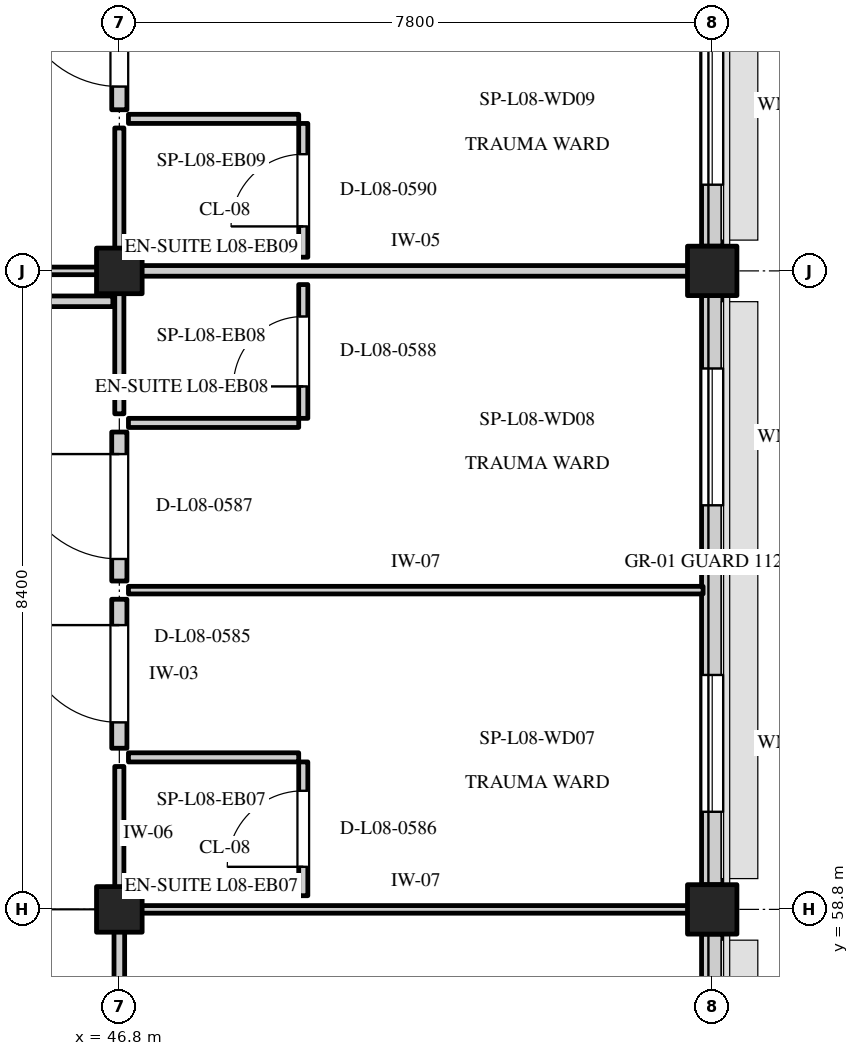
"""IFC4 building model, lengths in metres.
Left out: names, types, materials, properties, quantities, classifications, styles, units other than length and angle.
Written with IfcOpenShell. Run it as: python <this file> out.ifc"""

import sys

from ifc_helpers import new_model, si_unit, direction, frame, frame_2d, origin, origin_2d, place, context, subcontext, project, spatial, rectangle, extrude, element, fill, save


model = new_model("IFC4")
c1 = context("Model", 3, precision=1e-05, world=origin(), true_north=direction((0.0, 1.0)))
c2 = subcontext(c1, "Body", "Model", "MODEL_VIEW")
j1 = project(units=[si_unit("LENGTHUNIT", "METRE"), si_unit("PLANEANGLEUNIT", "RADIAN")], contexts=[c1])
p1 = place(None, origin())
s1 = spatial("IfcSite", under=j1, at=p1, CompositionType="ELEMENT")
p2 = place(p1, origin())
s2 = spatial("IfcBuilding", under=s1, at=p2, CompositionType="ELEMENT")
p3 = place(p2, frame((0.0, 0.0, 33.9)))
s3 = spatial("IfcBuildingStorey", under=s2, at=p3, CompositionType="ELEMENT", Elevation=33.9)
for number, where, z_axis, x_axis in (
    (1, (46.8, 58.8, 0.0), (0.0, 0.0, 1.0), (1.0, 0.0, 0.0)),
    (2, (46.8, 67.2, 0.0), (0.0, 0.0, 1.0), (1.0, 0.0, 0.0)),
):
    element("IfcColumn", number, at=place(p3, frame(where, z_axis=z_axis, x_axis=x_axis)), inside=s3, PredefinedType="COLUMN", context=c2, shape_type="SweptSolid", body=[
        extrude(rectangle(XDim=0.6, YDim=0.6, at=origin_2d()), origin(), (0.0, 0.0, 1.0), 3.9),
    ])
for number, where, z_axis, x_axis in (
    (3, (54.6, 58.8, 0.0), (0.0, 0.0, 1.0), (1.0, 0.0, 0.0)),
    (4, (54.6, 67.2, 0.0), (0.0, 0.0, 1.0), (1.0, 0.0, 0.0)),
):
    element("IfcColumn", number, at=place(p3, frame(where, z_axis=z_axis, x_axis=x_axis)), inside=s3, PredefinedType="COLUMN", context=c2, shape_type="SweptSolid", body=[
        extrude(rectangle(XDim=0.65, YDim=0.65, at=origin_2d()), origin(), (0.0, 0.0, 1.0), 3.9),
    ])
p4 = place(p3, frame((54.6, 50.725, 0.0), z_axis=(0.0, 0.0, 1.0), x_axis=(0.0, 1.0, 0.0)))
e5 = element("IfcWall", 5, at=p4, inside=s3, PredefinedType="STANDARD", context=c2, shape_type="SweptSolid", body=[
    extrude(rectangle(XDim=7.75, YDim=0.28, at=frame_2d((3.875, 0.0))), origin(), (0.0, 0.0, 1.0), 2.95),
])
p5 = place(p4, frame((0.959, 0.0, 0.8)))
e6 = element("IfcOpeningElement", 6, at=p5, cuts=e5, PredefinedType="OPENING", context=c2, shape_type="SweptSolid", body=[
    extrude(rectangle(XDim=1.8, YDim=1.55, at=frame_2d((0.9, 0.775))), frame((0.0, 0.152, 0.0), z_axis=(0.0, -1.0, 0.0), x_axis=(1.0, 0.0, 0.0)), (0.0, 0.0, 1.0), 0.304),
])
p6 = place(p4, frame((4.991, 0.0, 0.8)))
e7 = element("IfcOpeningElement", 7, at=p6, cuts=e5, PredefinedType="OPENING", context=c2, shape_type="SweptSolid", body=[
    extrude(rectangle(XDim=1.8, YDim=1.55, at=frame_2d((0.9, 0.775))), frame((0.0, 0.152, 0.0), z_axis=(0.0, -1.0, 0.0), x_axis=(1.0, 0.0, 0.0)), (0.0, 0.0, 1.0), 0.304),
])
p7 = place(p3, frame((54.6, 59.125, 0.0), z_axis=(0.0, 0.0, 1.0), x_axis=(0.0, 1.0, 0.0)))
e8 = element("IfcWall", 8, at=p7, inside=s3, PredefinedType="STANDARD", context=c2, shape_type="SweptSolid", body=[
    extrude(rectangle(XDim=7.75, YDim=0.28, at=frame_2d((3.875, 0.0))), origin(), (0.0, 0.0, 1.0), 2.95),
])
p8 = place(p7, frame((0.959, 0.0, 0.8)))
e9 = element("IfcOpeningElement", 9, at=p8, cuts=e8, PredefinedType="OPENING", context=c2, shape_type="SweptSolid", body=[
    extrude(rectangle(XDim=1.8, YDim=1.45, at=frame_2d((0.9, 0.725))), frame((0.0, 0.152, 0.0), z_axis=(0.0, -1.0, 0.0), x_axis=(1.0, 0.0, 0.0)), (0.0, 0.0, 1.0), 0.304),
])
p9 = place(p7, frame((4.991, 0.0, 0.8)))
e10 = element("IfcOpeningElement", 10, at=p9, cuts=e8, PredefinedType="OPENING", context=c2, shape_type="SweptSolid", body=[
    extrude(rectangle(XDim=1.8, YDim=1.45, at=frame_2d((0.9, 0.725))), frame((0.0, 0.152, 0.0), z_axis=(0.0, -1.0, 0.0), x_axis=(1.0, 0.0, 0.0)), (0.0, 0.0, 1.0), 0.304),
])
p10 = place(p3, frame((54.6, 67.525, 0.0), z_axis=(0.0, 0.0, 1.0), x_axis=(0.0, 1.0, 0.0)))
e11 = element("IfcWall", 11, at=p10, inside=s3, PredefinedType="STANDARD", context=c2, shape_type="SweptSolid", body=[
    extrude(rectangle(XDim=7.75, YDim=0.28, at=frame_2d((3.875, 0.0))), origin(), (0.0, 0.0, 1.0), 2.95),
])
p11 = place(p10, frame((0.809, 0.0, 0.8)))
e12 = element("IfcOpeningElement", 12, at=p11, cuts=e11, PredefinedType="OPENING", context=c2, shape_type="SweptSolid", body=[
    extrude(rectangle(XDim=2.1, YDim=1.75, at=frame_2d((1.05, 0.875))), frame((0.0, 0.152, 0.0), z_axis=(0.0, -1.0, 0.0), x_axis=(1.0, 0.0, 0.0)), (0.0, 0.0, 1.0), 0.304),
])
p12 = place(p10, frame((4.841, 0.0, 0.8)))
e13 = element("IfcOpeningElement", 13, at=p12, cuts=e11, PredefinedType="OPENING", context=c2, shape_type="SweptSolid", body=[
    extrude(rectangle(XDim=2.1, YDim=1.75, at=frame_2d((1.05, 0.875))), frame((0.0, 0.152, 0.0), z_axis=(0.0, -1.0, 0.0), x_axis=(1.0, 0.0, 0.0)), (0.0, 0.0, 1.0), 0.304),
])
p13 = place(p3, frame((46.92, 58.8, 0.0), z_axis=(0.0, 0.0, 1.0), x_axis=(1.0, 0.0, 0.0)))
e14 = element("IfcWall", 14, at=p13, inside=s3, PredefinedType="PARTITIONING", context=c2, shape_type="SweptSolid", body=[
    extrude(rectangle(XDim=7.56, YDim=0.1, at=frame_2d((3.78, 0.0))), origin(), (0.0, 0.0, 1.0), 2.95),
])
p14 = place(p3, frame((46.92, 63.0, 0.0), z_axis=(0.0, 0.0, 1.0), x_axis=(1.0, 0.0, 0.0)))
e15 = element("IfcWall", 15, at=p14, inside=s3, PredefinedType="PARTITIONING", context=c2, shape_type="SweptSolid", body=[
    extrude(rectangle(XDim=7.56, YDim=0.1, at=frame_2d((3.78, 0.0))), origin(), (0.0, 0.0, 1.0), 3.58),
])
p15 = place(p3, frame((46.8, 60.92, 0.0), z_axis=(0.0, 0.0, 1.0), x_axis=(0.0, 1.0, 0.0)))
e16 = element("IfcWall", 16, at=p15, inside=s3, PredefinedType="STANDARD", context=c2, shape_type="SweptSolid", body=[
    extrude(rectangle(XDim=1.96, YDim=0.2, at=frame_2d((0.98, 0.0))), origin(), (0.0, 0.0, 1.0), 3.58),
])
p16 = place(p15, frame((0.34, 0.0, 0.0)))
e17 = element("IfcOpeningElement", 17, at=p16, cuts=e16, PredefinedType="OPENING", context=c2, shape_type="SweptSolid", body=[
    extrude(rectangle(XDim=1.28, YDim=2.15, at=frame_2d((0.64, 1.075))), frame((0.0, 0.112, 0.0), z_axis=(0.0, -1.0, 0.0), x_axis=(1.0, 0.0, 0.0)), (0.0, 0.0, 1.0), 0.224),
])
p17 = place(p3, frame((46.8, 58.92, 0.0), z_axis=(0.0, 0.0, 1.0), x_axis=(0.0, 1.0, 0.0)))
e18 = element("IfcWall", 18, at=p17, inside=s3, PredefinedType="PARTITIONING", context=c2, shape_type="SweptSolid", body=[
    extrude(rectangle(XDim=1.76, YDim=0.12, at=frame_2d((0.88, 0.0))), origin(), (0.0, 0.0, 1.0), 3.58),
])
p18 = place(p3, frame((46.92, 60.8, 0.0), z_axis=(0.0, 0.0, 1.0), x_axis=(1.0, 0.0, 0.0)))
e19 = element("IfcWall", 19, at=p18, inside=s3, PredefinedType="PARTITIONING", context=c2, shape_type="SweptSolid", body=[
    extrude(rectangle(XDim=2.24, YDim=0.12, at=frame_2d((1.12, 0.0))), origin(), (0.0, 0.0, 1.0), 3.58),
])
p19 = place(p3, frame((49.22, 58.98, 0.0), z_axis=(0.0, 0.0, 1.0), x_axis=(0.0, 1.0, 0.0)))
e20 = element("IfcWall", 20, at=p19, inside=s3, PredefinedType="PARTITIONING", context=c2, shape_type="SweptSolid", body=[
    extrude(rectangle(XDim=1.76, YDim=0.12, at=frame_2d((0.88, 0.0))), origin(), (0.0, 0.0, 1.0), 3.58),
])
p20 = place(p19, frame((0.38, 0.0, 0.0)))
e21 = element("IfcOpeningElement", 21, at=p20, cuts=e20, PredefinedType="OPENING", context=c2, shape_type="SweptSolid", body=[
    extrude(rectangle(XDim=1.0, YDim=2.1, at=frame_2d((0.5, 1.05))), frame((0.0, 0.072, 0.0), z_axis=(0.0, -1.0, 0.0), x_axis=(1.0, 0.0, 0.0)), (0.0, 0.0, 1.0), 0.144),
])
p21 = place(p3, frame((46.92, 67.2, 0.0), z_axis=(0.0, 0.0, 1.0), x_axis=(1.0, 0.0, 0.0)))
e22 = element("IfcWall", 22, at=p21, inside=s3, PredefinedType="PARTITIONING", context=c2, shape_type="SweptSolid", body=[
    extrude(rectangle(XDim=7.56, YDim=0.14, at=frame_2d((3.78, 0.0))), origin(), (0.0, 0.0, 1.0), 3.58),
])
p22 = place(p3, frame((46.8, 63.12, 0.0), z_axis=(0.0, 0.0, 1.0), x_axis=(0.0, 1.0, 0.0)))
e23 = element("IfcWall", 23, at=p22, inside=s3, PredefinedType="STANDARD", context=c2, shape_type="SweptSolid", body=[
    extrude(rectangle(XDim=1.96, YDim=0.2, at=frame_2d((0.98, 0.0))), origin(), (0.0, 0.0, 1.0), 3.58),
])
p23 = place(p22, frame((0.29, 0.0, 0.0)))
e24 = element("IfcOpeningElement", 24, at=p23, cuts=e23, PredefinedType="OPENING", context=c2, shape_type="SweptSolid", body=[
    extrude(rectangle(XDim=1.38, YDim=2.2, at=frame_2d((0.69, 1.1))), frame((0.0, 0.112, 0.0), z_axis=(0.0, -1.0, 0.0), x_axis=(1.0, 0.0, 0.0)), (0.0, 0.0, 1.0), 0.224),
])
p24 = place(p3, frame((46.8, 65.32, 0.0), z_axis=(0.0, 0.0, 1.0), x_axis=(0.0, 1.0, 0.0)))
e25 = element("IfcWall", 25, at=p24, inside=s3, PredefinedType="PARTITIONING", context=c2, shape_type="SweptSolid", body=[
    extrude(rectangle(XDim=1.76, YDim=0.12, at=frame_2d((0.88, 0.0))), origin(), (0.0, 0.0, 1.0), 3.58),
])
p25 = place(p3, frame((46.92, 65.2, 0.0), z_axis=(0.0, 0.0, 1.0), x_axis=(1.0, 0.0, 0.0)))
e26 = element("IfcWall", 26, at=p25, inside=s3, PredefinedType="PARTITIONING", context=c2, shape_type="SweptSolid", body=[
    extrude(rectangle(XDim=2.24, YDim=0.12, at=frame_2d((1.12, 0.0))), origin(), (0.0, 0.0, 1.0), 3.58),
])
p26 = place(p3, frame((49.22, 65.26, 0.0), z_axis=(0.0, 0.0, 1.0), x_axis=(0.0, 1.0, 0.0)))
e27 = element("IfcWall", 27, at=p26, inside=s3, PredefinedType="PARTITIONING", context=c2, shape_type="SweptSolid", body=[
    extrude(rectangle(XDim=1.76, YDim=0.12, at=frame_2d((0.88, 0.0))), origin(), (0.0, 0.0, 1.0), 3.58),
])
p27 = place(p26, frame((0.42, 0.0, 0.0)))
e28 = element("IfcOpeningElement", 28, at=p27, cuts=e27, PredefinedType="OPENING", context=c2, shape_type="SweptSolid", body=[
    extrude(rectangle(XDim=0.92, YDim=2.08, at=frame_2d((0.46, 1.04))), frame((0.0, 0.072, 0.0), z_axis=(0.0, -1.0, 0.0), x_axis=(1.0, 0.0, 0.0)), (0.0, 0.0, 1.0), 0.144),
])
p28 = place(p3, frame((46.8, 69.32, 0.0), z_axis=(0.0, 0.0, 1.0), x_axis=(0.0, 1.0, 0.0)))
e29 = element("IfcWall", 29, at=p28, inside=s3, PredefinedType="STANDARD", context=c2, shape_type="SweptSolid", body=[
    extrude(rectangle(XDim=1.96, YDim=0.2, at=frame_2d((0.98, 0.0))), origin(), (0.0, 0.0, 1.0), 3.58),
])
p29 = place(p28, frame((0.305, 0.0, 0.0)))
e30 = element("IfcOpeningElement", 30, at=p29, cuts=e29, PredefinedType="OPENING", context=c2, shape_type="SweptSolid", body=[
    extrude(rectangle(XDim=1.35, YDim=2.15, at=frame_2d((0.675, 1.075))), frame((0.0, 0.112, 0.0), z_axis=(0.0, -1.0, 0.0), x_axis=(1.0, 0.0, 0.0)), (0.0, 0.0, 1.0), 0.224),
])
p30 = place(p3, frame((46.8, 67.32, 0.0), z_axis=(0.0, 0.0, 1.0), x_axis=(0.0, 1.0, 0.0)))
e31 = element("IfcWall", 31, at=p30, inside=s3, PredefinedType="PARTITIONING", context=c2, shape_type="SweptSolid", body=[
    extrude(rectangle(XDim=1.76, YDim=0.12, at=frame_2d((0.88, 0.0))), origin(), (0.0, 0.0, 1.0), 3.58),
])
p31 = place(p3, frame((46.92, 69.2, 0.0), z_axis=(0.0, 0.0, 1.0), x_axis=(1.0, 0.0, 0.0)))
e32 = element("IfcWall", 32, at=p31, inside=s3, PredefinedType="PARTITIONING", context=c2, shape_type="SweptSolid", body=[
    extrude(rectangle(XDim=2.24, YDim=0.12, at=frame_2d((1.12, 0.0))), origin(), (0.0, 0.0, 1.0), 3.58),
])
p32 = place(p3, frame((49.22, 67.38, 0.0), z_axis=(0.0, 0.0, 1.0), x_axis=(0.0, 1.0, 0.0)))
e33 = element("IfcWall", 33, at=p32, inside=s3, PredefinedType="PARTITIONING", context=c2, shape_type="SweptSolid", body=[
    extrude(rectangle(XDim=1.76, YDim=0.12, at=frame_2d((0.88, 0.0))), origin(), (0.0, 0.0, 1.0), 3.58),
])
p33 = place(p32, frame((0.405, 0.0, 0.0)))
e34 = element("IfcOpeningElement", 34, at=p33, cuts=e33, PredefinedType="OPENING", context=c2, shape_type="SweptSolid", body=[
    extrude(rectangle(XDim=0.95, YDim=2.1, at=frame_2d((0.475, 1.05))), frame((0.0, 0.072, 0.0), z_axis=(0.0, -1.0, 0.0), x_axis=(1.0, 0.0, 0.0)), (0.0, 0.0, 1.0), 0.144),
])
p34 = place(p3, frame((31.285, 66.8, 0.0), z_axis=(0.0, 0.0, 1.0), x_axis=(1.0, 0.0, 0.0)))
e35 = element("IfcWall", 35, at=p34, inside=s3, PredefinedType="PARTITIONING", context=c2, shape_type="SweptSolid", body=[
    extrude(rectangle(XDim=15.43, YDim=0.14, at=frame_2d((7.715, 0.0))), origin(), (0.0, 0.0, 1.0), 3.58),
])
p35 = place(p3, frame((46.8, 54.085, 0.0), z_axis=(0.0, 0.0, 1.0), x_axis=(0.0, 1.0, 0.0)))
e36 = element("IfcWall", 36, at=p35, inside=s3, PredefinedType="PARTITIONING", context=c2, shape_type="SweptSolid", body=[
    extrude(rectangle(XDim=4.795, YDim=0.14, at=frame_2d((2.397, 0.0))), origin(), (0.0, 0.0, 1.0), 3.58),
])
p36 = place(p3, frame((31.285, 67.2, 0.0), z_axis=(0.0, 0.0, 1.0), x_axis=(1.0, 0.0, 0.0)))
e37 = element("IfcWall", 37, at=p36, inside=s3, PredefinedType="PARTITIONING", context=c2, shape_type="SweptSolid", body=[
    extrude(rectangle(XDim=15.43, YDim=0.1, at=frame_2d((7.715, 0.0))), origin(), (0.0, 0.0, 1.0), 3.58),
])
p37 = place(p8, origin())
e38 = element("IfcWindow", 38, at=p37, inside=s3, PartitioningType="DOUBLE_PANEL_VERTICAL", PredefinedType="WINDOW", context=c2, shape_type="SweptSolid", body=[
    extrude(rectangle(XDim=1.8, YDim=1.45, at=frame_2d((0.9, 0.725))), frame((0.0, 0.03, 0.0), z_axis=(0.0, -1.0, 0.0), x_axis=(1.0, 0.0, 0.0)), (0.0, 0.0, 1.0), 0.06),
])
fill(e9, e38)
p38 = place(p9, origin())
e39 = element("IfcWindow", 39, at=p38, inside=s3, PartitioningType="DOUBLE_PANEL_VERTICAL", PredefinedType="WINDOW", context=c2, shape_type="SweptSolid", body=[
    extrude(rectangle(XDim=1.8, YDim=1.45, at=frame_2d((0.9, 0.725))), frame((0.0, 0.03, 0.0), z_axis=(0.0, -1.0, 0.0), x_axis=(1.0, 0.0, 0.0)), (0.0, 0.0, 1.0), 0.06),
])
fill(e10, e39)
p39 = place(p11, origin())
e40 = element("IfcWindow", 40, at=p39, inside=s3, PartitioningType="DOUBLE_PANEL_VERTICAL", PredefinedType="WINDOW", context=c2, shape_type="SweptSolid", body=[
    extrude(rectangle(XDim=2.1, YDim=1.75, at=frame_2d((1.05, 0.875))), frame((0.0, 0.03, 0.0), z_axis=(0.0, -1.0, 0.0), x_axis=(1.0, 0.0, 0.0)), (0.0, 0.0, 1.0), 0.06),
])
fill(e12, e40)
p40 = place(p16, frame((1.28, 0.0, 0.0), z_axis=(0.0, 0.0, 1.0), x_axis=(-1.0, 0.0, 0.0)))
e41 = element("IfcDoor", 41, at=p40, inside=s3, OperationType="SINGLE_SWING_LEFT", PredefinedType="DOOR", context=c2, shape_type="SweptSolid", body=[
    extrude(rectangle(XDim=1.28, YDim=2.15, at=frame_2d((0.64, 1.075))), frame((0.0, 0.025, 0.0), z_axis=(0.0, -1.0, 0.0), x_axis=(1.0, 0.0, 0.0)), (0.0, 0.0, 1.0), 0.05),
])
fill(e17, e41)
p41 = place(p20, origin())
e42 = element("IfcDoor", 42, at=p41, inside=s3, OperationType="SINGLE_SWING_LEFT", PredefinedType="DOOR", context=c2, shape_type="SweptSolid", body=[
    extrude(rectangle(XDim=1.0, YDim=2.1, at=frame_2d((0.5, 1.05))), frame((0.0, 0.025, 0.0), z_axis=(0.0, -1.0, 0.0), x_axis=(1.0, 0.0, 0.0)), (0.0, 0.0, 1.0), 0.05),
])
fill(e21, e42)
p42 = place(p23, frame((1.38, 0.0, 0.0), z_axis=(0.0, 0.0, 1.0), x_axis=(-1.0, 0.0, 0.0)))
e43 = element("IfcDoor", 43, at=p42, inside=s3, OperationType="SINGLE_SWING_LEFT", PredefinedType="DOOR", context=c2, shape_type="SweptSolid", body=[
    extrude(rectangle(XDim=1.38, YDim=2.2, at=frame_2d((0.69, 1.1))), frame((0.0, 0.025, 0.0), z_axis=(0.0, -1.0, 0.0), x_axis=(1.0, 0.0, 0.0)), (0.0, 0.0, 1.0), 0.05),
])
fill(e24, e43)
p43 = place(p27, origin())
e44 = element("IfcDoor", 44, at=p43, inside=s3, OperationType="SINGLE_SWING_LEFT", PredefinedType="DOOR", context=c2, shape_type="SweptSolid", body=[
    extrude(rectangle(XDim=0.92, YDim=2.08, at=frame_2d((0.46, 1.04))), frame((0.0, 0.025, 0.0), z_axis=(0.0, -1.0, 0.0), x_axis=(1.0, 0.0, 0.0)), (0.0, 0.0, 1.0), 0.05),
])
fill(e28, e44)
p44 = place(p29, frame((1.35, 0.0, 0.0), z_axis=(0.0, 0.0, 1.0), x_axis=(-1.0, 0.0, 0.0)))
e45 = element("IfcDoor", 45, at=p44, inside=s3, OperationType="SINGLE_SWING_LEFT", PredefinedType="DOOR", context=c2, shape_type="SweptSolid", body=[
    extrude(rectangle(XDim=1.35, YDim=2.15, at=frame_2d((0.675, 1.075))), frame((0.0, 0.025, 0.0), z_axis=(0.0, -1.0, 0.0), x_axis=(1.0, 0.0, 0.0)), (0.0, 0.0, 1.0), 0.05),
])
fill(e30, e45)
p45 = place(p33, origin())
e46 = element("IfcDoor", 46, at=p45, inside=s3, OperationType="SINGLE_SWING_LEFT", PredefinedType="DOOR", context=c2, shape_type="SweptSolid", body=[
    extrude(rectangle(XDim=0.95, YDim=2.1, at=frame_2d((0.475, 1.05))), frame((0.0, 0.025, 0.0), z_axis=(0.0, -1.0, 0.0), x_axis=(1.0, 0.0, 0.0)), (0.0, 0.0, 1.0), 0.05),
])
fill(e34, e46)
save(model, sys.argv[1])
